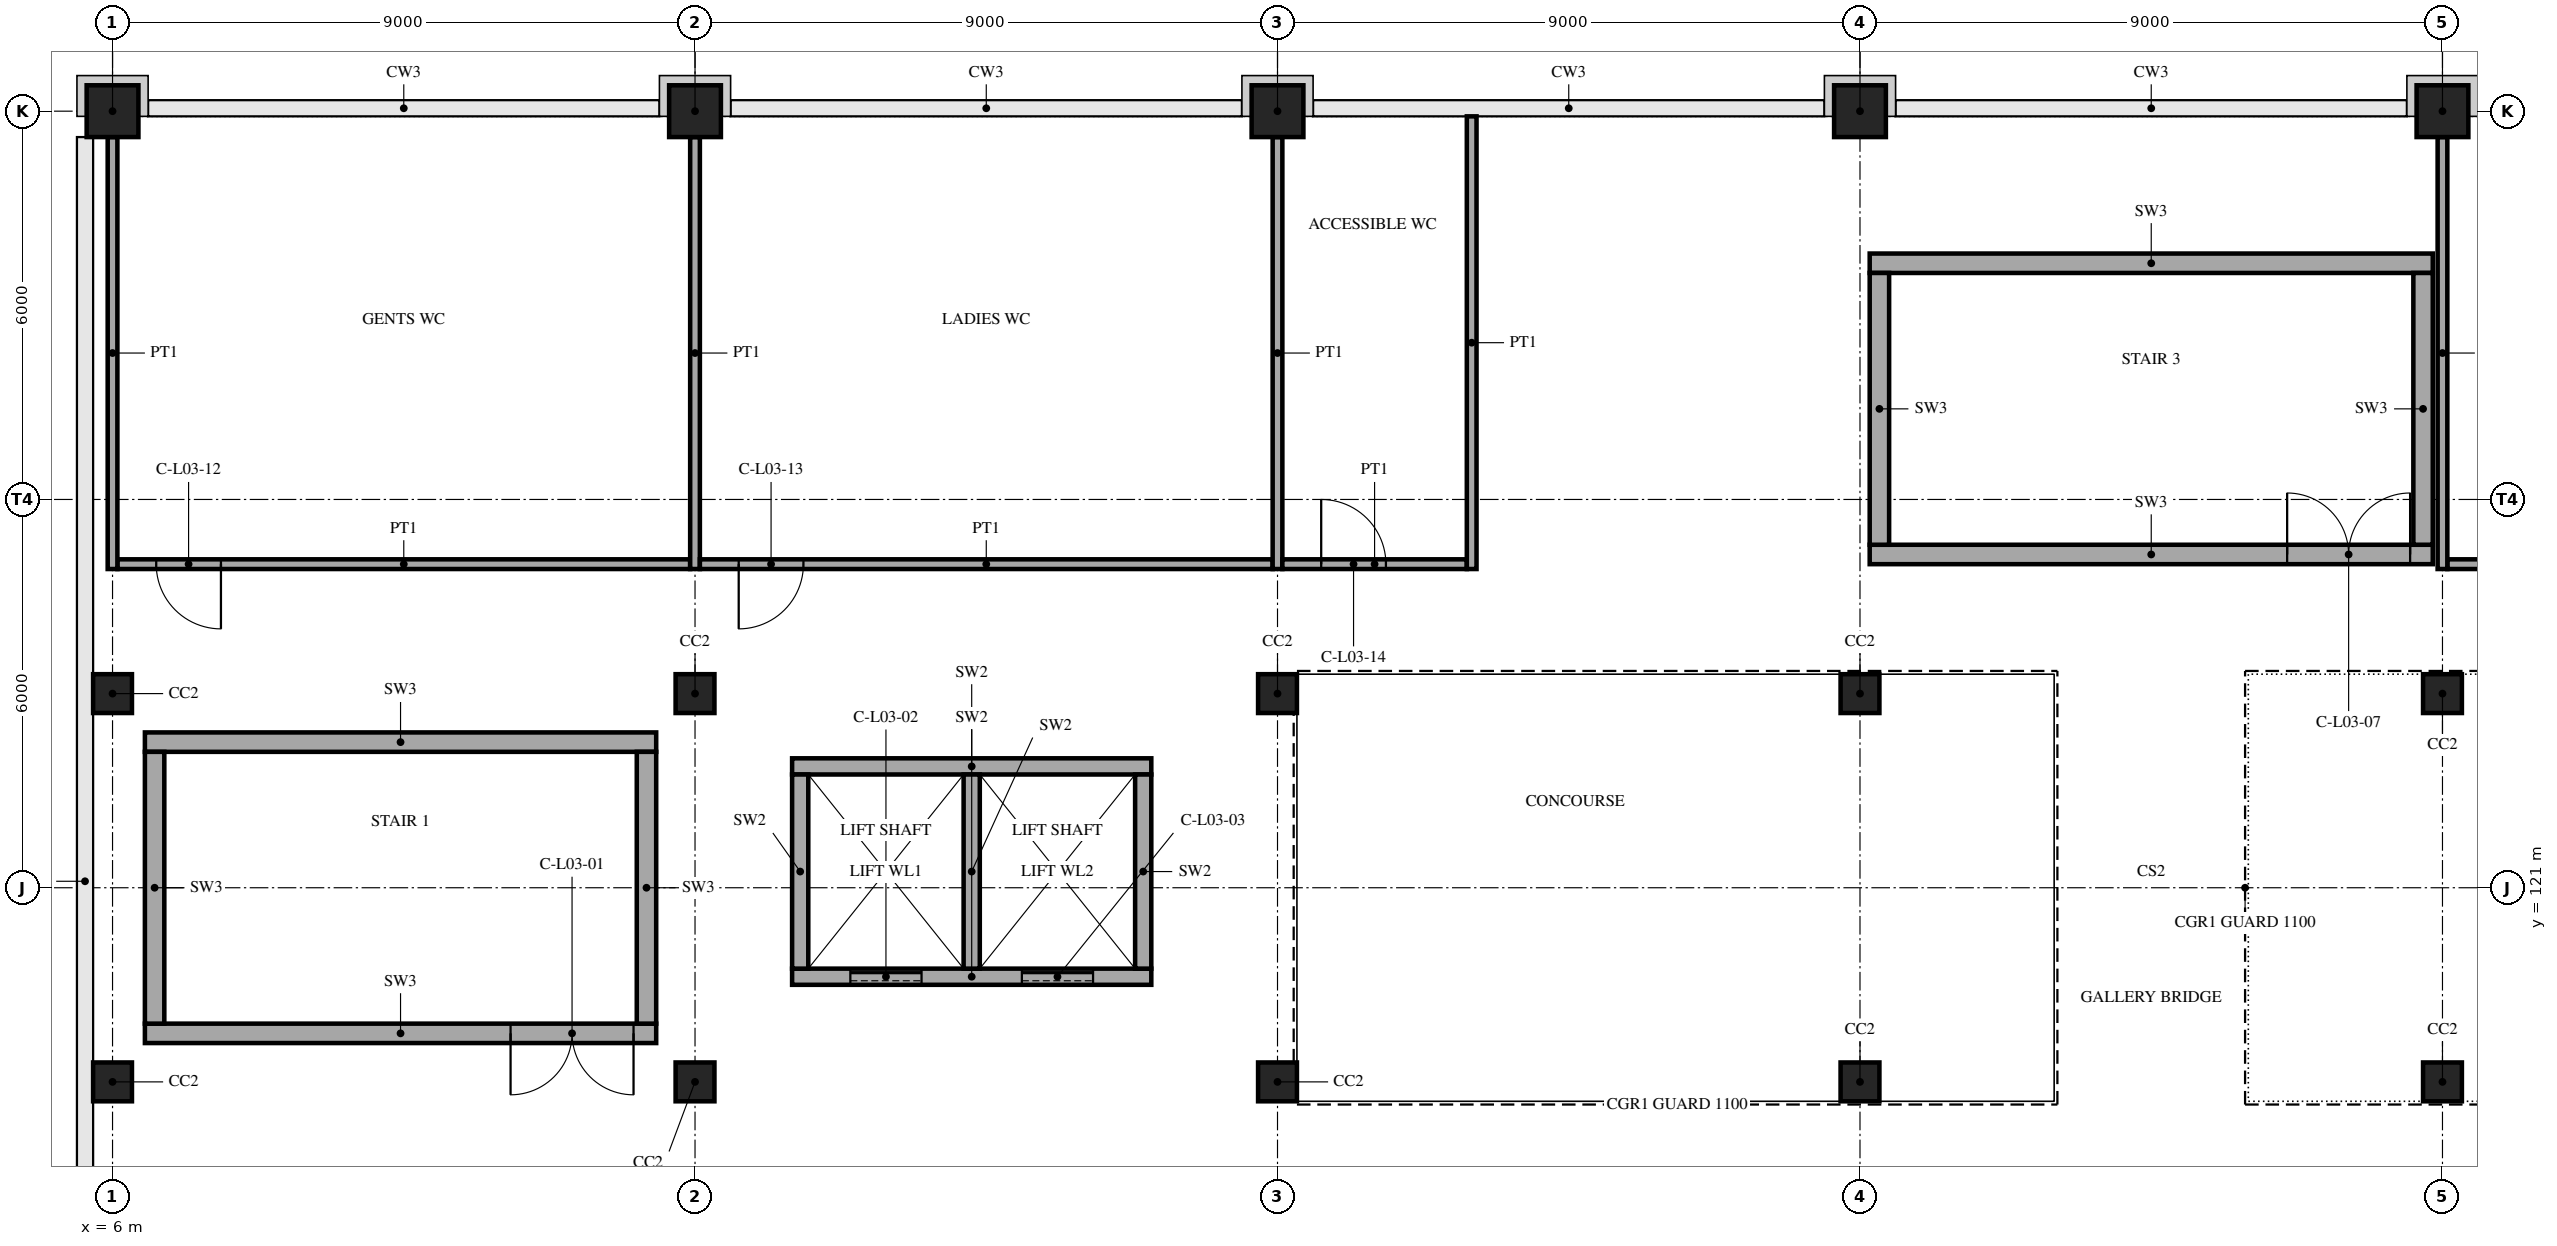
"""IFC4 building model, lengths in metres.
Left out: names, types, materials, properties, quantities, classifications, styles, units other than length and angle.
Written with IfcOpenShell. Run it as: python <this file> out.ifc"""

import sys

from ifc_helpers import new_model, si_unit, direction, frame, frame_2d, origin, origin_2d, place, context, subcontext, project, spatial, rectangle, extrude, element, fill, save


model = new_model("IFC4")
c1 = context("Model", 3, precision=1e-05, world=origin(), true_north=direction((0.0, 1.0)))
c2 = subcontext(c1, "Body", "Model", "MODEL_VIEW")
j1 = project(units=[si_unit("LENGTHUNIT", "METRE"), si_unit("PLANEANGLEUNIT", "RADIAN")], contexts=[c1])
p1 = place(None, origin())
s1 = spatial("IfcSite", under=j1, at=p1, CompositionType="ELEMENT")
p2 = place(p1, origin())
s2 = spatial("IfcBuilding", under=s1, at=p2, CompositionType="ELEMENT")
p3 = place(p2, frame((0.0, 0.0, 15.0)))
s3 = spatial("IfcBuildingStorey", under=s2, at=p3, CompositionType="ELEMENT", Elevation=15.0)
for number, where, z_axis, x_axis in (
    (1, (6.0, 118.0, 0.0), (0.0, 0.0, 1.0), (1.0, 0.0, 0.0)),
    (2, (6.0, 124.0, 0.0), (0.0, 0.0, 1.0), (1.0, 0.0, 0.0)),
):
    element("IfcColumn", number, at=place(p3, frame(where, z_axis=z_axis, x_axis=x_axis)), inside=s3, PredefinedType="COLUMN", context=c2, shape_type="SweptSolid", body=[
        extrude(rectangle(XDim=0.6, YDim=0.6, at=origin_2d()), origin(), (0.0, 0.0, 1.0), 4.2),
    ])
p4 = place(p3, frame((6.0, 133.0, 0.0), z_axis=(0.0, 0.0, 1.0), x_axis=(1.0, 0.0, 0.0)))
e3 = element("IfcColumn", 3, at=p4, inside=s3, PredefinedType="COLUMN", context=c2, shape_type="SweptSolid", body=[
    extrude(rectangle(XDim=0.8, YDim=0.8, at=origin_2d()), origin(), (0.0, 0.0, 1.0), 4.2),
])
for number, where, z_axis, x_axis in (
    (4, (15.0, 118.0, 0.0), (0.0, 0.0, 1.0), (1.0, 0.0, 0.0)),
    (5, (15.0, 124.0, 0.0), (0.0, 0.0, 1.0), (1.0, 0.0, 0.0)),
):
    element("IfcColumn", number, at=place(p3, frame(where, z_axis=z_axis, x_axis=x_axis)), inside=s3, PredefinedType="COLUMN", context=c2, shape_type="SweptSolid", body=[
        extrude(rectangle(XDim=0.6, YDim=0.6, at=origin_2d()), origin(), (0.0, 0.0, 1.0), 4.2),
    ])
p5 = place(p3, frame((15.0, 133.0, 0.0), z_axis=(0.0, 0.0, 1.0), x_axis=(1.0, 0.0, 0.0)))
e6 = element("IfcColumn", 6, at=p5, inside=s3, PredefinedType="COLUMN", context=c2, shape_type="SweptSolid", body=[
    extrude(rectangle(XDim=0.8, YDim=0.8, at=origin_2d()), origin(), (0.0, 0.0, 1.0), 4.2),
])
for number, where, z_axis, x_axis in (
    (7, (24.0, 118.0, 0.0), (0.0, 0.0, 1.0), (1.0, 0.0, 0.0)),
    (8, (24.0, 124.0, 0.0), (0.0, 0.0, 1.0), (1.0, 0.0, 0.0)),
):
    element("IfcColumn", number, at=place(p3, frame(where, z_axis=z_axis, x_axis=x_axis)), inside=s3, PredefinedType="COLUMN", context=c2, shape_type="SweptSolid", body=[
        extrude(rectangle(XDim=0.6, YDim=0.6, at=origin_2d()), origin(), (0.0, 0.0, 1.0), 4.2),
    ])
p6 = place(p3, frame((24.0, 133.0, 0.0), z_axis=(0.0, 0.0, 1.0), x_axis=(1.0, 0.0, 0.0)))
e9 = element("IfcColumn", 9, at=p6, inside=s3, PredefinedType="COLUMN", context=c2, shape_type="SweptSolid", body=[
    extrude(rectangle(XDim=0.8, YDim=0.8, at=origin_2d()), origin(), (0.0, 0.0, 1.0), 4.2),
])
for number, where, z_axis, x_axis in (
    (10, (33.0, 118.0, 0.0), (0.0, 0.0, 1.0), (1.0, 0.0, 0.0)),
    (11, (33.0, 124.0, 0.0), (0.0, 0.0, 1.0), (1.0, 0.0, 0.0)),
):
    element("IfcColumn", number, at=place(p3, frame(where, z_axis=z_axis, x_axis=x_axis)), inside=s3, PredefinedType="COLUMN", context=c2, shape_type="SweptSolid", body=[
        extrude(rectangle(XDim=0.6, YDim=0.6, at=origin_2d()), origin(), (0.0, 0.0, 1.0), 4.2),
    ])
p7 = place(p3, frame((33.0, 133.0, 0.0), z_axis=(0.0, 0.0, 1.0), x_axis=(1.0, 0.0, 0.0)))
e12 = element("IfcColumn", 12, at=p7, inside=s3, PredefinedType="COLUMN", context=c2, shape_type="SweptSolid", body=[
    extrude(rectangle(XDim=0.8, YDim=0.8, at=origin_2d()), origin(), (0.0, 0.0, 1.0), 4.2),
])
for number, where, z_axis, x_axis in (
    (13, (42.0, 118.0, 0.0), (0.0, 0.0, 1.0), (1.0, 0.0, 0.0)),
    (14, (42.0, 124.0, 0.0), (0.0, 0.0, 1.0), (1.0, 0.0, 0.0)),
):
    element("IfcColumn", number, at=place(p3, frame(where, z_axis=z_axis, x_axis=x_axis)), inside=s3, PredefinedType="COLUMN", context=c2, shape_type="SweptSolid", body=[
        extrude(rectangle(XDim=0.6, YDim=0.6, at=origin_2d()), origin(), (0.0, 0.0, 1.0), 4.2),
    ])
p8 = place(p3, frame((42.0, 133.0, 0.0), z_axis=(0.0, 0.0, 1.0), x_axis=(1.0, 0.0, 0.0)))
e15 = element("IfcColumn", 15, at=p8, inside=s3, PredefinedType="COLUMN", context=c2, shape_type="SweptSolid", body=[
    extrude(rectangle(XDim=0.8, YDim=0.8, at=origin_2d()), origin(), (0.0, 0.0, 1.0), 4.2),
])
p9 = place(p3, frame((6.5, 118.75, 0.0), z_axis=(0.0, 0.0, 1.0), x_axis=(1.0, 0.0, 0.0)))
e16 = element("IfcWall", 16, at=p9, inside=s3, PredefinedType="SHEAR", context=c2, shape_type="SweptSolid", body=[
    extrude(rectangle(XDim=7.9, YDim=0.3, at=frame_2d((3.95, 0.0))), origin(), (0.0, 0.0, 1.0), 4.2),
])
p10 = place(p9, frame((5.65, 0.0, 0.0)))
e17 = element("IfcOpeningElement", 17, at=p10, cuts=e16, PredefinedType="OPENING", context=c2, shape_type="SweptSolid", body=[
    extrude(rectangle(XDim=1.9, YDim=2.1, at=frame_2d((0.95, 1.05))), frame((0.0, 0.16, 0.0), z_axis=(0.0, -1.0, 0.0), x_axis=(1.0, 0.0, 0.0)), (0.0, 0.0, 1.0), 0.32),
])
p11 = place(p3, frame((6.5, 123.25, 0.0), z_axis=(0.0, 0.0, 1.0), x_axis=(1.0, 0.0, 0.0)))
e18 = element("IfcWall", 18, at=p11, inside=s3, PredefinedType="SHEAR", context=c2, shape_type="SweptSolid", body=[
    extrude(rectangle(XDim=7.9, YDim=0.3, at=frame_2d((3.95, 0.0))), origin(), (0.0, 0.0, 1.0), 4.2),
])
for number, where, z_axis, x_axis in (
    (19, (6.65, 118.9, 0.0), (0.0, 0.0, 1.0), (0.0, 1.0, 0.0)),
    (20, (14.25, 118.9, 0.0), (0.0, 0.0, 1.0), (0.0, 1.0, 0.0)),
):
    element("IfcWall", number, at=place(p3, frame(where, z_axis=z_axis, x_axis=x_axis)), inside=s3, PredefinedType="SHEAR", context=c2, shape_type="SweptSolid", body=[
        extrude(rectangle(XDim=4.2, YDim=0.3, at=frame_2d((2.1, 0.0))), origin(), (0.0, 0.0, 1.0), 4.2),
    ])
p12 = place(p3, frame((16.5, 119.625, 0.0), z_axis=(0.0, 0.0, 1.0), x_axis=(1.0, 0.0, 0.0)))
e21 = element("IfcWall", 21, at=p12, inside=s3, PredefinedType="SHEAR", context=c2, shape_type="SweptSolid", body=[
    extrude(rectangle(XDim=5.55, YDim=0.25, at=frame_2d((2.775, 0.0))), origin(), (0.0, 0.0, 1.0), 4.2),
])
p13 = place(p12, frame((0.9, 0.0, 0.0)))
e22 = element("IfcOpeningElement", 22, at=p13, cuts=e21, PredefinedType="OPENING", context=c2, shape_type="SweptSolid", body=[
    extrude(rectangle(XDim=1.1, YDim=2.1, at=frame_2d((0.55, 1.05))), frame((0.0, 0.135, 0.0), z_axis=(0.0, -1.0, 0.0), x_axis=(1.0, 0.0, 0.0)), (0.0, 0.0, 1.0), 0.27),
])
p14 = place(p12, frame((3.55, 0.0, 0.0)))
e23 = element("IfcOpeningElement", 23, at=p14, cuts=e21, PredefinedType="OPENING", context=c2, shape_type="SweptSolid", body=[
    extrude(rectangle(XDim=1.1, YDim=2.1, at=frame_2d((0.55, 1.05))), frame((0.0, 0.135, 0.0), z_axis=(0.0, -1.0, 0.0), x_axis=(1.0, 0.0, 0.0)), (0.0, 0.0, 1.0), 0.27),
])
p15 = place(p3, frame((16.5, 122.875, 0.0), z_axis=(0.0, 0.0, 1.0), x_axis=(1.0, 0.0, 0.0)))
e24 = element("IfcWall", 24, at=p15, inside=s3, PredefinedType="SHEAR", context=c2, shape_type="SweptSolid", body=[
    extrude(rectangle(XDim=5.55, YDim=0.25, at=frame_2d((2.775, 0.0))), origin(), (0.0, 0.0, 1.0), 4.2),
])
for number, where, z_axis, x_axis in (
    (25, (16.625, 119.75, 0.0), (0.0, 0.0, 1.0), (0.0, 1.0, 0.0)),
    (26, (21.925, 119.75, 0.0), (0.0, 0.0, 1.0), (0.0, 1.0, 0.0)),
    (27, (19.275, 119.75, 0.0), (0.0, 0.0, 1.0), (0.0, 1.0, 0.0)),
):
    element("IfcWall", number, at=place(p3, frame(where, z_axis=z_axis, x_axis=x_axis)), inside=s3, PredefinedType="SHEAR", context=c2, shape_type="SweptSolid", body=[
        extrude(rectangle(XDim=3.0, YDim=0.25, at=frame_2d((1.5, 0.0))), origin(), (0.0, 0.0, 1.0), 4.2),
    ])
p16 = place(p3, frame((33.15, 126.15, 0.0), z_axis=(0.0, 0.0, 1.0), x_axis=(1.0, 0.0, 0.0)))
e28 = element("IfcWall", 28, at=p16, inside=s3, PredefinedType="SHEAR", context=c2, shape_type="SweptSolid", body=[
    extrude(rectangle(XDim=8.7, YDim=0.3, at=frame_2d((4.35, 0.0))), origin(), (0.0, 0.0, 1.0), 4.2),
])
p17 = place(p16, frame((6.45, 0.0, 0.0)))
e29 = element("IfcOpeningElement", 29, at=p17, cuts=e28, PredefinedType="OPENING", context=c2, shape_type="SweptSolid", body=[
    extrude(rectangle(XDim=1.9, YDim=2.1, at=frame_2d((0.95, 1.05))), frame((0.0, 0.16, 0.0), z_axis=(0.0, -1.0, 0.0), x_axis=(1.0, 0.0, 0.0)), (0.0, 0.0, 1.0), 0.32),
])
p18 = place(p3, frame((33.15, 130.65, 0.0), z_axis=(0.0, 0.0, 1.0), x_axis=(1.0, 0.0, 0.0)))
e30 = element("IfcWall", 30, at=p18, inside=s3, PredefinedType="SHEAR", context=c2, shape_type="SweptSolid", body=[
    extrude(rectangle(XDim=8.7, YDim=0.3, at=frame_2d((4.35, 0.0))), origin(), (0.0, 0.0, 1.0), 4.2),
])
for number, where, z_axis, x_axis in (
    (31, (33.3, 126.3, 0.0), (0.0, 0.0, 1.0), (0.0, 1.0, 0.0)),
    (32, (41.7, 126.3, 0.0), (0.0, 0.0, 1.0), (0.0, 1.0, 0.0)),
):
    element("IfcWall", number, at=place(p3, frame(where, z_axis=z_axis, x_axis=x_axis)), inside=s3, PredefinedType="SHEAR", context=c2, shape_type="SweptSolid", body=[
        extrude(rectangle(XDim=4.2, YDim=0.3, at=frame_2d((2.1, 0.0))), origin(), (0.0, 0.0, 1.0), 4.2),
    ])
p19 = place(p3, frame((6.075, 126.0, 0.0), z_axis=(0.0, 0.0, 1.0), x_axis=(1.0, 0.0, 0.0)))
e33 = element("IfcWall", 33, at=p19, inside=s3, PredefinedType="PARTITIONING", context=c2, shape_type="SweptSolid", body=[
    extrude(rectangle(XDim=8.85, YDim=0.15, at=frame_2d((4.425, 0.0))), origin(), (0.0, 0.0, 1.0), 4.2),
])
p20 = place(p19, frame((0.6, 0.0, 0.0)))
e34 = element("IfcOpeningElement", 34, at=p20, cuts=e33, PredefinedType="OPENING", context=c2, shape_type="SweptSolid", body=[
    extrude(rectangle(XDim=1.0, YDim=2.1, at=frame_2d((0.5, 1.05))), frame((0.0, 0.085, 0.0), z_axis=(0.0, -1.0, 0.0), x_axis=(1.0, 0.0, 0.0)), (0.0, 0.0, 1.0), 0.17),
])
for number, where, z_axis, x_axis in (
    (35, (6.0, 125.925, 0.0), (0.0, 0.0, 1.0), (0.0, 1.0, 0.0)),
    (36, (15.0, 125.925, 0.0), (0.0, 0.0, 1.0), (0.0, 1.0, 0.0)),
):
    element("IfcWall", number, at=place(p3, frame(where, z_axis=z_axis, x_axis=x_axis)), inside=s3, PredefinedType="PARTITIONING", context=c2, shape_type="SweptSolid", body=[
        extrude(rectangle(XDim=6.675, YDim=0.15, at=frame_2d((3.337, 0.0))), origin(), (0.0, 0.0, 1.0), 4.2),
    ])
p21 = place(p3, frame((15.075, 126.0, 0.0), z_axis=(0.0, 0.0, 1.0), x_axis=(1.0, 0.0, 0.0)))
e37 = element("IfcWall", 37, at=p21, inside=s3, PredefinedType="PARTITIONING", context=c2, shape_type="SweptSolid", body=[
    extrude(rectangle(XDim=8.85, YDim=0.15, at=frame_2d((4.425, 0.0))), origin(), (0.0, 0.0, 1.0), 4.2),
])
p22 = place(p21, frame((0.6, 0.0, 0.0)))
e38 = element("IfcOpeningElement", 38, at=p22, cuts=e37, PredefinedType="OPENING", context=c2, shape_type="SweptSolid", body=[
    extrude(rectangle(XDim=1.0, YDim=2.1, at=frame_2d((0.5, 1.05))), frame((0.0, 0.085, 0.0), z_axis=(0.0, -1.0, 0.0), x_axis=(1.0, 0.0, 0.0)), (0.0, 0.0, 1.0), 0.17),
])
p23 = place(p3, frame((24.0, 125.925, 0.0), z_axis=(0.0, 0.0, 1.0), x_axis=(0.0, 1.0, 0.0)))
e39 = element("IfcWall", 39, at=p23, inside=s3, PredefinedType="PARTITIONING", context=c2, shape_type="SweptSolid", body=[
    extrude(rectangle(XDim=6.675, YDim=0.15, at=frame_2d((3.337, 0.0))), origin(), (0.0, 0.0, 1.0), 4.2),
])
p24 = place(p3, frame((24.075, 126.0, 0.0), z_axis=(0.0, 0.0, 1.0), x_axis=(1.0, 0.0, 0.0)))
e40 = element("IfcWall", 40, at=p24, inside=s3, PredefinedType="PARTITIONING", context=c2, shape_type="SweptSolid", body=[
    extrude(rectangle(XDim=2.85, YDim=0.15, at=frame_2d((1.425, 0.0))), origin(), (0.0, 0.0, 1.0), 4.2),
])
p25 = place(p24, frame((0.6, 0.0, 0.0)))
e41 = element("IfcOpeningElement", 41, at=p25, cuts=e40, PredefinedType="OPENING", context=c2, shape_type="SweptSolid", body=[
    extrude(rectangle(XDim=1.0, YDim=2.1, at=frame_2d((0.5, 1.05))), frame((0.0, 0.085, 0.0), z_axis=(0.0, -1.0, 0.0), x_axis=(1.0, 0.0, 0.0)), (0.0, 0.0, 1.0), 0.17),
])
p26 = place(p3, frame((27.0, 125.925, 0.0), z_axis=(0.0, 0.0, 1.0), x_axis=(0.0, 1.0, 0.0)))
e42 = element("IfcWall", 42, at=p26, inside=s3, PredefinedType="PARTITIONING", context=c2, shape_type="SweptSolid", body=[
    extrude(rectangle(XDim=6.995, YDim=0.15, at=frame_2d((3.498, 0.0))), origin(), (0.0, 0.0, 1.0), 4.2),
])
p27 = place(p3, frame((42.075, 126.0, 0.0), z_axis=(0.0, 0.0, 1.0), x_axis=(1.0, 0.0, 0.0)))
e43 = element("IfcWall", 43, at=p27, inside=s3, PredefinedType="PARTITIONING", context=c2, shape_type="SweptSolid", body=[
    extrude(rectangle(XDim=8.85, YDim=0.15, at=frame_2d((4.425, 0.0))), origin(), (0.0, 0.0, 1.0), 4.2),
])
p28 = place(p27, frame((0.6, 0.0, 0.0)))
e44 = element("IfcOpeningElement", 44, at=p28, cuts=e43, PredefinedType="OPENING", context=c2, shape_type="SweptSolid", body=[
    extrude(rectangle(XDim=1.0, YDim=2.1, at=frame_2d((0.5, 1.05))), frame((0.0, 0.085, 0.0), z_axis=(0.0, -1.0, 0.0), x_axis=(1.0, 0.0, 0.0)), (0.0, 0.0, 1.0), 0.17),
])
p29 = place(p27, frame((2.2, 0.0, 0.9)))
e45 = element("IfcOpeningElement", 45, at=p29, cuts=e43, PredefinedType="OPENING", context=c2, shape_type="SweptSolid", body=[
    extrude(rectangle(XDim=2.4, YDim=1.5, at=frame_2d((1.2, 0.75))), frame((0.0, 0.085, 0.0), z_axis=(0.0, -1.0, 0.0), x_axis=(1.0, 0.0, 0.0)), (0.0, 0.0, 1.0), 0.17),
])
p30 = place(p27, frame((5.2, 0.0, 0.9)))
e46 = element("IfcOpeningElement", 46, at=p30, cuts=e43, PredefinedType="OPENING", context=c2, shape_type="SweptSolid", body=[
    extrude(rectangle(XDim=2.4, YDim=1.5, at=frame_2d((1.2, 0.75))), frame((0.0, 0.085, 0.0), z_axis=(0.0, -1.0, 0.0), x_axis=(1.0, 0.0, 0.0)), (0.0, 0.0, 1.0), 0.17),
])
p31 = place(p3, frame((42.0, 125.925, 0.0), z_axis=(0.0, 0.0, 1.0), x_axis=(0.0, 1.0, 0.0)))
e47 = element("IfcWall", 47, at=p31, inside=s3, PredefinedType="PARTITIONING", context=c2, shape_type="SweptSolid", body=[
    extrude(rectangle(XDim=6.675, YDim=0.15, at=frame_2d((3.337, 0.0))), origin(), (0.0, 0.0, 1.0), 4.2),
])
p32 = place(p10, frame((1.9, 0.0, 0.0), z_axis=(0.0, 0.0, 1.0), x_axis=(-1.0, 0.0, 0.0)))
e48 = element("IfcDoor", 48, at=p32, inside=s3, OperationType="DOUBLE_DOOR_SINGLE_SWING", PredefinedType="NOTDEFINED", context=c2, shape_type="SweptSolid", body=[
    extrude(rectangle(XDim=1.9, YDim=2.1, at=frame_2d((0.95, 1.05))), frame((0.0, 0.025, 0.0), z_axis=(0.0, -1.0, 0.0), x_axis=(1.0, 0.0, 0.0)), (0.0, 0.0, 1.0), 0.05),
])
fill(e17, e48)
p33 = place(p13, origin())
e49 = element("IfcDoor", 49, at=p33, inside=s3, OperationType="DOUBLE_DOOR_SLIDING", PredefinedType="NOTDEFINED", context=c2, shape_type="SweptSolid", body=[
    extrude(rectangle(XDim=1.1, YDim=2.1, at=frame_2d((0.55, 1.05))), frame((0.0, 0.025, 0.0), z_axis=(0.0, -1.0, 0.0), x_axis=(1.0, 0.0, 0.0)), (0.0, 0.0, 1.0), 0.05),
])
fill(e22, e49)
p34 = place(p14, origin())
e50 = element("IfcDoor", 50, at=p34, inside=s3, OperationType="DOUBLE_DOOR_SLIDING", PredefinedType="NOTDEFINED", context=c2, shape_type="SweptSolid", body=[
    extrude(rectangle(XDim=1.1, YDim=2.1, at=frame_2d((0.55, 1.05))), frame((0.0, 0.025, 0.0), z_axis=(0.0, -1.0, 0.0), x_axis=(1.0, 0.0, 0.0)), (0.0, 0.0, 1.0), 0.05),
])
fill(e23, e50)
p35 = place(p17, origin())
e51 = element("IfcDoor", 51, at=p35, inside=s3, OperationType="DOUBLE_DOOR_SINGLE_SWING", PredefinedType="NOTDEFINED", context=c2, shape_type="SweptSolid", body=[
    extrude(rectangle(XDim=1.9, YDim=2.1, at=frame_2d((0.95, 1.05))), frame((0.0, 0.025, 0.0), z_axis=(0.0, -1.0, 0.0), x_axis=(1.0, 0.0, 0.0)), (0.0, 0.0, 1.0), 0.05),
])
fill(e29, e51)
p36 = place(p20, frame((1.0, 0.0, 0.0), z_axis=(0.0, 0.0, 1.0), x_axis=(-1.0, 0.0, 0.0)))
e52 = element("IfcDoor", 52, at=p36, inside=s3, OperationType="SINGLE_SWING_LEFT", PredefinedType="NOTDEFINED", context=c2, shape_type="SweptSolid", body=[
    extrude(rectangle(XDim=1.0, YDim=2.1, at=frame_2d((0.5, 1.05))), frame((0.0, 0.025, 0.0), z_axis=(0.0, -1.0, 0.0), x_axis=(1.0, 0.0, 0.0)), (0.0, 0.0, 1.0), 0.05),
])
fill(e34, e52)
p37 = place(p22, frame((1.0, 0.0, 0.0), z_axis=(0.0, 0.0, 1.0), x_axis=(-1.0, 0.0, 0.0)))
e53 = element("IfcDoor", 53, at=p37, inside=s3, OperationType="SINGLE_SWING_RIGHT", PredefinedType="NOTDEFINED", context=c2, shape_type="SweptSolid", body=[
    extrude(rectangle(XDim=1.0, YDim=2.1, at=frame_2d((0.5, 1.05))), frame((0.0, 0.025, 0.0), z_axis=(0.0, -1.0, 0.0), x_axis=(1.0, 0.0, 0.0)), (0.0, 0.0, 1.0), 0.05),
])
fill(e38, e53)
p38 = place(p25, origin())
e54 = element("IfcDoor", 54, at=p38, inside=s3, OperationType="SINGLE_SWING_LEFT", PredefinedType="NOTDEFINED", context=c2, shape_type="SweptSolid", body=[
    extrude(rectangle(XDim=1.0, YDim=2.1, at=frame_2d((0.5, 1.05))), frame((0.0, 0.025, 0.0), z_axis=(0.0, -1.0, 0.0), x_axis=(1.0, 0.0, 0.0)), (0.0, 0.0, 1.0), 0.05),
])
fill(e41, e54)
save(model, sys.argv[1])
